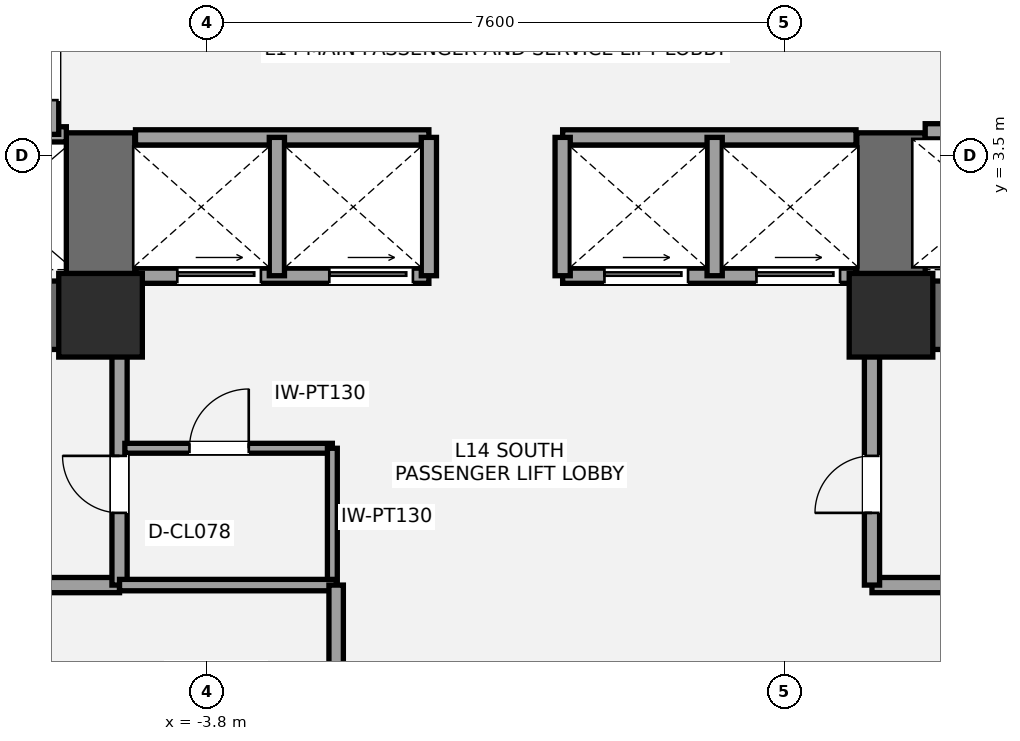
"""IFC4 building model, lengths in metres.
Left out: names, types, materials, properties, quantities, classifications, styles, units other than length and angle.
Written with IfcOpenShell. Run it as: python <this file> out.ifc"""

import sys

from ifc_helpers import new_model, si_unit, direction, frame, frame_2d, origin, origin_2d, place, context, subcontext, project, spatial, rectangle, extrude, element, fill, save


model = new_model("IFC4")
c1 = context("Model", 3, precision=1e-05, world=origin(), true_north=direction((0.0, 1.0)))
c2 = subcontext(c1, "Body", "Model", "MODEL_VIEW")
j1 = project(units=[si_unit("LENGTHUNIT", "METRE"), si_unit("PLANEANGLEUNIT", "RADIAN")], contexts=[c1])
p1 = place(None, origin())
s1 = spatial("IfcSite", under=j1, at=p1, CompositionType="ELEMENT")
p2 = place(p1, origin())
s2 = spatial("IfcBuilding", under=s1, at=p2, CompositionType="ELEMENT")
p3 = place(p2, frame((0.0, 0.0, 55.8)))
s3 = spatial("IfcBuildingStorey", under=s2, at=p3, CompositionType="ELEMENT", Elevation=55.8)
p4 = place(p3, frame((-4.75, 1.4, 0.0), z_axis=(0.0, 0.0, 1.0), x_axis=(-1.0, 0.0, 0.0)))
e1 = element("IfcWall", 1, at=p4, inside=s3, PredefinedType="SHEAR", context=c2, shape_type="SweptSolid", body=[
    extrude(rectangle(XDim=9.3, YDim=0.9, at=frame_2d((4.65, 0.0))), origin(), (0.0, 0.0, 1.0), 3.6),
])
p5 = place(p4, frame((5.55, 0.0, 0.0)))
e2 = element("IfcOpeningElement", 2, at=p5, cuts=e1, PredefinedType="OPENING", context=c2, shape_type="SweptSolid", body=[
    extrude(rectangle(XDim=1.05, YDim=2.15, at=frame_2d((0.525, 1.075))), frame((0.0, 0.46, 0.0), z_axis=(0.0, -1.0, 0.0), x_axis=(1.0, 0.0, 0.0)), (0.0, 0.0, 1.0), 0.92),
])
p6 = place(p4, frame((3.88, 0.0, 0.0)))
e3 = element("IfcOpeningElement", 3, at=p6, cuts=e1, PredefinedType="OPENING", context=c2, shape_type="SweptSolid", body=[
    extrude(rectangle(XDim=1.1, YDim=2.2, at=frame_2d((0.55, 1.1))), frame((0.0, 0.46, 0.0), z_axis=(0.0, -1.0, 0.0), x_axis=(1.0, 0.0, 0.0)), (0.0, 0.0, 1.0), 0.92),
])
p7 = place(p3, frame((-5.2, 0.95, 0.0), z_axis=(0.0, 0.0, 1.0), x_axis=(0.0, 1.0, 0.0)))
e4 = element("IfcWall", 4, at=p7, inside=s3, PredefinedType="SHEAR", context=c2, shape_type="SweptSolid", body=[
    extrude(rectangle(XDim=2.85, YDim=0.9, at=frame_2d((1.425, 0.0))), origin(), (0.0, 0.0, 1.0), 3.6),
])
p8 = place(p3, frame((14.05, 1.4, 0.0), z_axis=(0.0, 0.0, 1.0), x_axis=(-1.0, 0.0, 0.0)))
e5 = element("IfcWall", 5, at=p8, inside=s3, PredefinedType="SHEAR", context=c2, shape_type="SweptSolid", body=[
    extrude(rectangle(XDim=9.3, YDim=0.9, at=frame_2d((4.65, 0.0))), origin(), (0.0, 0.0, 1.0), 3.6),
])
p9 = place(p8, frame((2.7, 0.0, 0.0)))
e6 = element("IfcOpeningElement", 6, at=p9, cuts=e5, PredefinedType="OPENING", context=c2, shape_type="SweptSolid", body=[
    extrude(rectangle(XDim=1.05, YDim=2.15, at=frame_2d((0.525, 1.075))), frame((0.0, 0.46, 0.0), z_axis=(0.0, -1.0, 0.0), x_axis=(1.0, 0.0, 0.0)), (0.0, 0.0, 1.0), 0.92),
])
p10 = place(p8, frame((4.7, 0.0, 0.0)))
e7 = element("IfcOpeningElement", 7, at=p10, cuts=e5, PredefinedType="OPENING", context=c2, shape_type="SweptSolid", body=[
    extrude(rectangle(XDim=1.1, YDim=2.2, at=frame_2d((0.55, 1.1))), frame((0.0, 0.46, 0.0), z_axis=(0.0, -1.0, 0.0), x_axis=(1.0, 0.0, 0.0)), (0.0, 0.0, 1.0), 0.92),
])
p11 = place(p3, frame((5.2, 0.95, 0.0), z_axis=(0.0, 0.0, 1.0), x_axis=(0.0, 1.0, 0.0)))
e8 = element("IfcWall", 8, at=p11, inside=s3, PredefinedType="SHEAR", context=c2, shape_type="SweptSolid", body=[
    extrude(rectangle(XDim=2.85, YDim=0.9, at=frame_2d((1.425, 0.0))), origin(), (0.0, 0.0, 1.0), 3.6),
])
for number, where, z_axis, x_axis in (
    (9, (-5.2, 1.4, 0.0), (0.0, 0.0, 1.0), (1.0, 0.0, 0.0)),
    (10, (5.2, 1.4, 0.0), (0.0, 0.0, 1.0), (1.0, 0.0, 0.0)),
):
    element("IfcColumn", number, at=place(p3, frame(where, z_axis=z_axis, x_axis=x_axis)), inside=s3, PredefinedType="COLUMN", context=c2, shape_type="SweptSolid", body=[
        extrude(rectangle(XDim=1.1, YDim=1.1, at=origin_2d()), origin(), (0.0, 0.0, 1.0), 3.6),
    ])
p12 = place(p3, frame((-7.2, -2.15, 0.0), z_axis=(0.0, 0.0, 1.0), x_axis=(1.0, 0.0, 0.0)))
e11 = element("IfcWall", 11, at=p12, inside=s3, PredefinedType="SOLIDWALL", context=c2, shape_type="SweptSolid", body=[
    extrude(rectangle(XDim=2.25, YDim=0.2, at=frame_2d((1.125, 0.0))), origin(), (0.0, 0.0, 1.0), 3.4),
])
p13 = place(p3, frame((-4.95, -2.15, 0.0), z_axis=(0.0, 0.0, 1.0), x_axis=(0.0, 1.0, 0.0)))
e12 = element("IfcWall", 12, at=p13, inside=s3, PredefinedType="SOLIDWALL", context=c2, shape_type="SweptSolid", body=[
    extrude(rectangle(XDim=3.15, YDim=0.2, at=frame_2d((1.575, 0.0))), origin(), (0.0, 0.0, 1.0), 2.853),
])
p14 = place(p13, frame((0.95, 0.0, 0.0)))
e13 = element("IfcOpeningElement", 13, at=p14, cuts=e12, PredefinedType="OPENING", context=c2, shape_type="SweptSolid", body=[
    extrude(rectangle(XDim=0.75, YDim=2.1, at=frame_2d((0.375, 1.05))), frame((0.0, 0.11, 0.0), z_axis=(0.0, -1.0, 0.0), x_axis=(1.0, 0.0, 0.0)), (0.0, 0.0, 1.0), 0.22),
])
p15 = place(p3, frame((4.95, -2.15, 0.0), z_axis=(0.0, 0.0, 1.0), x_axis=(1.0, 0.0, 0.0)))
e14 = element("IfcWall", 14, at=p15, inside=s3, PredefinedType="SOLIDWALL", context=c2, shape_type="SweptSolid", body=[
    extrude(rectangle(XDim=2.25, YDim=0.2, at=frame_2d((1.125, 0.0))), origin(), (0.0, 0.0, 1.0), 3.4),
])
p16 = place(p3, frame((4.95, -2.15, 0.0), z_axis=(0.0, 0.0, 1.0), x_axis=(0.0, 1.0, 0.0)))
e15 = element("IfcWall", 15, at=p16, inside=s3, PredefinedType="SOLIDWALL", context=c2, shape_type="SweptSolid", body=[
    extrude(rectangle(XDim=3.15, YDim=0.2, at=frame_2d((1.575, 0.0))), origin(), (0.0, 0.0, 1.0), 2.853),
])
p17 = place(p16, frame((0.95, 0.0, 0.0)))
e16 = element("IfcOpeningElement", 16, at=p17, cuts=e15, PredefinedType="OPENING", context=c2, shape_type="SweptSolid", body=[
    extrude(rectangle(XDim=0.75, YDim=2.1, at=frame_2d((0.375, 1.05))), frame((0.0, 0.11, 0.0), z_axis=(0.0, -1.0, 0.0), x_axis=(1.0, 0.0, 0.0)), (0.0, 0.0, 1.0), 0.22),
])
p18 = place(p3, frame((-4.88, -0.35, 0.0), z_axis=(0.0, 0.0, 1.0), x_axis=(1.0, 0.0, 0.0)))
e17 = element("IfcWall", 17, at=p18, inside=s3, PredefinedType="PARTITIONING", context=c2, shape_type="SweptSolid", body=[
    extrude(rectangle(XDim=2.73, YDim=0.13, at=frame_2d((1.365, 0.0))), origin(), (0.0, 0.0, 1.0), 3.4),
])
p19 = place(p18, frame((0.85, 0.0, 0.0)))
e18 = element("IfcOpeningElement", 18, at=p19, cuts=e17, PredefinedType="OPENING", context=c2, shape_type="SweptSolid", body=[
    extrude(rectangle(XDim=0.78, YDim=2.1, at=frame_2d((0.39, 1.05))), frame((0.0, 0.075, 0.0), z_axis=(0.0, -1.0, 0.0), x_axis=(1.0, 0.0, 0.0)), (0.0, 0.0, 1.0), 0.15),
])
p20 = place(p3, frame((-2.15, -2.15, 0.0), z_axis=(0.0, 0.0, 1.0), x_axis=(0.0, 1.0, 0.0)))
e19 = element("IfcWall", 19, at=p20, inside=s3, PredefinedType="PARTITIONING", context=c2, shape_type="SweptSolid", body=[
    extrude(rectangle(XDim=1.8, YDim=0.13, at=frame_2d((0.9, 0.0))), origin(), (0.0, 0.0, 1.0), 3.4),
])
p21 = place(p3, frame((-9.78, 3.78, 0.0), z_axis=(0.0, 0.0, 1.0), x_axis=(1.0, 0.0, 0.0)))
e20 = element("IfcWall", 20, at=p21, inside=s3, PredefinedType="SOLIDWALL", context=c2, shape_type="SweptSolid", body=[
    extrude(rectangle(XDim=4.13, YDim=0.2, at=frame_2d((2.065, 0.0))), origin(), (0.0, 0.0, 1.0), 3.4),
])
p22 = place(p3, frame((-5.85, 3.78, 0.0), z_axis=(0.0, 0.0, 1.0), x_axis=(0.0, 1.0, 0.0)))
e21 = element("IfcWall", 21, at=p22, inside=s3, PredefinedType="SOLIDWALL", context=c2, shape_type="SweptSolid", body=[
    extrude(rectangle(XDim=1.69, YDim=0.2, at=frame_2d((0.845, 0.0))), origin(), (0.0, 0.0, 1.0), 3.4),
])
p23 = place(p22, frame((0.45, 0.0, 0.0)))
e22 = element("IfcOpeningElement", 22, at=p23, cuts=e21, PredefinedType="OPENING", context=c2, shape_type="SweptSolid", body=[
    extrude(rectangle(XDim=0.75, YDim=2.1, at=frame_2d((0.375, 1.05))), frame((0.0, 0.11, 0.0), z_axis=(0.0, -1.0, 0.0), x_axis=(1.0, 0.0, 0.0)), (0.0, 0.0, 1.0), 0.22),
])
p24 = place(p3, frame((5.65, 3.82, 0.0), z_axis=(0.0, 0.0, 1.0), x_axis=(1.0, 0.0, 0.0)))
e23 = element("IfcWall", 23, at=p24, inside=s3, PredefinedType="SOLIDWALL", context=c2, shape_type="SweptSolid", body=[
    extrude(rectangle(XDim=4.13, YDim=0.2, at=frame_2d((2.065, 0.0))), origin(), (0.0, 0.0, 1.0), 3.4),
])
p25 = place(p24, frame((0.65, 0.0, 0.0)))
e24 = element("IfcOpeningElement", 24, at=p25, cuts=e23, PredefinedType="OPENING", context=c2, shape_type="SweptSolid", body=[
    extrude(rectangle(XDim=1.2, YDim=2.2, at=frame_2d((0.6, 1.1))), frame((0.0, 0.11, 0.0), z_axis=(0.0, -1.0, 0.0), x_axis=(1.0, 0.0, 0.0)), (0.0, 0.0, 1.0), 0.22),
])
p26 = place(p3, frame((-4.74, 1.92, 0.0), z_axis=(0.0, 0.0, 1.0), x_axis=(1.0, 0.0, 0.0)))
e25 = element("IfcWall", 25, at=p26, inside=s3, PredefinedType="SOLIDWALL", context=c2, shape_type="SweptSolid", body=[
    extrude(rectangle(XDim=3.86, YDim=0.2, at=frame_2d((1.93, 0.0))), origin(), (0.0, 0.0, 1.0), 2.39),
])
p27 = place(p26, frame((0.55, 0.0, 0.0)))
e26 = element("IfcOpeningElement", 26, at=p27, cuts=e25, PredefinedType="OPENING", context=c2, shape_type="SweptSolid", body=[
    extrude(rectangle(XDim=1.1, YDim=2.2, at=frame_2d((0.55, 1.1))), frame((0.0, 0.11, 0.0), z_axis=(0.0, -1.0, 0.0), x_axis=(1.0, 0.0, 0.0)), (0.0, 0.0, 1.0), 0.22),
])
p28 = place(p26, frame((2.55, 0.0, 0.0)))
e27 = element("IfcOpeningElement", 27, at=p28, cuts=e25, PredefinedType="OPENING", context=c2, shape_type="SweptSolid", body=[
    extrude(rectangle(XDim=1.1, YDim=2.2, at=frame_2d((0.55, 1.1))), frame((0.0, 0.11, 0.0), z_axis=(0.0, -1.0, 0.0), x_axis=(1.0, 0.0, 0.0)), (0.0, 0.0, 1.0), 0.22),
])
p29 = place(p3, frame((0.88, 1.92, 0.0), z_axis=(0.0, 0.0, 1.0), x_axis=(1.0, 0.0, 0.0)))
e28 = element("IfcWall", 28, at=p29, inside=s3, PredefinedType="SOLIDWALL", context=c2, shape_type="SweptSolid", body=[
    extrude(rectangle(XDim=3.86, YDim=0.2, at=frame_2d((1.93, 0.0))), origin(), (0.0, 0.0, 1.0), 2.39),
])
p30 = place(p29, frame((0.55, 0.0, 0.0)))
e29 = element("IfcOpeningElement", 29, at=p30, cuts=e28, PredefinedType="OPENING", context=c2, shape_type="SweptSolid", body=[
    extrude(rectangle(XDim=1.1, YDim=2.2, at=frame_2d((0.55, 1.1))), frame((0.0, 0.11, 0.0), z_axis=(0.0, -1.0, 0.0), x_axis=(1.0, 0.0, 0.0)), (0.0, 0.0, 1.0), 0.22),
])
p31 = place(p29, frame((2.55, 0.0, 0.0)))
e30 = element("IfcOpeningElement", 30, at=p31, cuts=e28, PredefinedType="OPENING", context=c2, shape_type="SweptSolid", body=[
    extrude(rectangle(XDim=1.1, YDim=2.2, at=frame_2d((0.55, 1.1))), frame((0.0, 0.11, 0.0), z_axis=(0.0, -1.0, 0.0), x_axis=(1.0, 0.0, 0.0)), (0.0, 0.0, 1.0), 0.22),
])
for number, where, z_axis, x_axis in (
    (31, (-4.74, 3.74, 0.0), (0.0, 0.0, 1.0), (1.0, 0.0, 0.0)),
    (32, (0.88, 3.74, 0.0), (0.0, 0.0, 1.0), (1.0, 0.0, 0.0)),
):
    element("IfcWall", number, at=place(p3, frame(where, z_axis=z_axis, x_axis=x_axis)), inside=s3, PredefinedType="SOLIDWALL", context=c2, shape_type="SweptSolid", body=[
        extrude(rectangle(XDim=3.86, YDim=0.2, at=frame_2d((1.93, 0.0))), origin(), (0.0, 0.0, 1.0), 3.4),
    ])
for number, where, z_axis, x_axis in (
    (33, (-2.88, 1.92, 0.0), (0.0, 0.0, 1.0), (0.0, 1.0, 0.0)),
    (34, (2.88, 1.92, 0.0), (0.0, 0.0, 1.0), (0.0, 1.0, 0.0)),
    (35, (-0.88, 1.92, 0.0), (0.0, 0.0, 1.0), (0.0, 1.0, 0.0)),
    (36, (0.88, 1.92, 0.0), (0.0, 0.0, 1.0), (0.0, 1.0, 0.0)),
):
    element("IfcWall", number, at=place(p3, frame(where, z_axis=z_axis, x_axis=x_axis)), inside=s3, PredefinedType="SOLIDWALL", context=c2, shape_type="SweptSolid", body=[
        extrude(rectangle(XDim=1.82, YDim=0.2, at=frame_2d((0.91, 0.0))), origin(), (0.0, 0.0, 1.0), 3.4),
    ])
p32 = place(p3, frame((-4.95, -2.15, 0.0), z_axis=(0.0, 0.0, 1.0), x_axis=(1.0, 0.0, 0.0)))
e37 = element("IfcWall", 37, at=p32, inside=s3, PredefinedType="PLUMBINGWALL", context=c2, shape_type="SweptSolid", body=[
    extrude(rectangle(XDim=2.85, YDim=0.15, at=frame_2d((1.425, 0.0))), origin(), (0.0, 0.0, 1.0), 3.4),
])
p33 = place(p3, frame((-2.1, -4.05, 0.0), z_axis=(0.0, 0.0, 1.0), x_axis=(0.0, 1.0, 0.0)))
e38 = element("IfcWall", 38, at=p33, inside=s3, PredefinedType="PLUMBINGWALL", context=c2, shape_type="SweptSolid", body=[
    extrude(rectangle(XDim=1.9, YDim=0.19, at=frame_2d((0.95, 0.0))), origin(), (0.0, 0.0, 1.0), 3.4),
])
p34 = place(p14, origin())
e39 = element("IfcDoor", 39, at=p34, inside=s3, OperationType="SINGLE_SWING_RIGHT", PredefinedType="DOOR", context=c2, shape_type="SweptSolid", body=[
    extrude(rectangle(XDim=0.75, YDim=2.1, at=frame_2d((0.375, 1.05))), frame((0.0, 0.025, 0.0), z_axis=(0.0, -1.0, 0.0), x_axis=(1.0, 0.0, 0.0)), (0.0, 0.0, 1.0), 0.05),
])
fill(e13, e39)
p35 = place(p17, origin())
e40 = element("IfcDoor", 40, at=p35, inside=s3, OperationType="SINGLE_SWING_LEFT", PredefinedType="DOOR", context=c2, shape_type="SweptSolid", body=[
    extrude(rectangle(XDim=0.75, YDim=2.1, at=frame_2d((0.375, 1.05))), frame((0.0, 0.025, 0.0), z_axis=(0.0, -1.0, 0.0), x_axis=(1.0, 0.0, 0.0)), (0.0, 0.0, 1.0), 0.05),
])
fill(e16, e40)
p36 = place(p19, origin())
e41 = element("IfcDoor", 41, at=p36, inside=s3, OperationType="SINGLE_SWING_RIGHT", PredefinedType="DOOR", context=c2, shape_type="SweptSolid", body=[
    extrude(rectangle(XDim=0.78, YDim=2.1, at=frame_2d((0.39, 1.05))), frame((0.0, 0.025, 0.0), z_axis=(0.0, -1.0, 0.0), x_axis=(1.0, 0.0, 0.0)), (0.0, 0.0, 1.0), 0.05),
])
fill(e18, e41)
p37 = place(p23, origin())
e42 = element("IfcDoor", 42, at=p37, inside=s3, OperationType="SINGLE_SWING_RIGHT", PredefinedType="DOOR", context=c2, shape_type="SweptSolid", body=[
    extrude(rectangle(XDim=0.75, YDim=2.1, at=frame_2d((0.375, 1.05))), frame((0.0, 0.025, 0.0), z_axis=(0.0, -1.0, 0.0), x_axis=(1.0, 0.0, 0.0)), (0.0, 0.0, 1.0), 0.05),
])
fill(e22, e42)
p38 = place(p27, origin())
e43 = element("IfcDoor", 43, at=p38, inside=s3, OperationType="SLIDING_TO_LEFT", PredefinedType="DOOR", context=c2, shape_type="SweptSolid", body=[
    extrude(rectangle(XDim=1.1, YDim=2.2, at=frame_2d((0.55, 1.1))), frame((0.0, 0.025, 0.0), z_axis=(0.0, -1.0, 0.0), x_axis=(1.0, 0.0, 0.0)), (0.0, 0.0, 1.0), 0.05),
])
fill(e26, e43)
p39 = place(p28, origin())
e44 = element("IfcDoor", 44, at=p39, inside=s3, OperationType="SLIDING_TO_LEFT", PredefinedType="DOOR", context=c2, shape_type="SweptSolid", body=[
    extrude(rectangle(XDim=1.1, YDim=2.2, at=frame_2d((0.55, 1.1))), frame((0.0, 0.025, 0.0), z_axis=(0.0, -1.0, 0.0), x_axis=(1.0, 0.0, 0.0)), (0.0, 0.0, 1.0), 0.05),
])
fill(e27, e44)
p40 = place(p30, origin())
e45 = element("IfcDoor", 45, at=p40, inside=s3, OperationType="SLIDING_TO_LEFT", PredefinedType="DOOR", context=c2, shape_type="SweptSolid", body=[
    extrude(rectangle(XDim=1.1, YDim=2.2, at=frame_2d((0.55, 1.1))), frame((0.0, 0.025, 0.0), z_axis=(0.0, -1.0, 0.0), x_axis=(1.0, 0.0, 0.0)), (0.0, 0.0, 1.0), 0.05),
])
fill(e29, e45)
p41 = place(p31, origin())
e46 = element("IfcDoor", 46, at=p41, inside=s3, OperationType="SLIDING_TO_LEFT", PredefinedType="DOOR", context=c2, shape_type="SweptSolid", body=[
    extrude(rectangle(XDim=1.1, YDim=2.2, at=frame_2d((0.55, 1.1))), frame((0.0, 0.025, 0.0), z_axis=(0.0, -1.0, 0.0), x_axis=(1.0, 0.0, 0.0)), (0.0, 0.0, 1.0), 0.05),
])
fill(e30, e46)
save(model, sys.argv[1])
